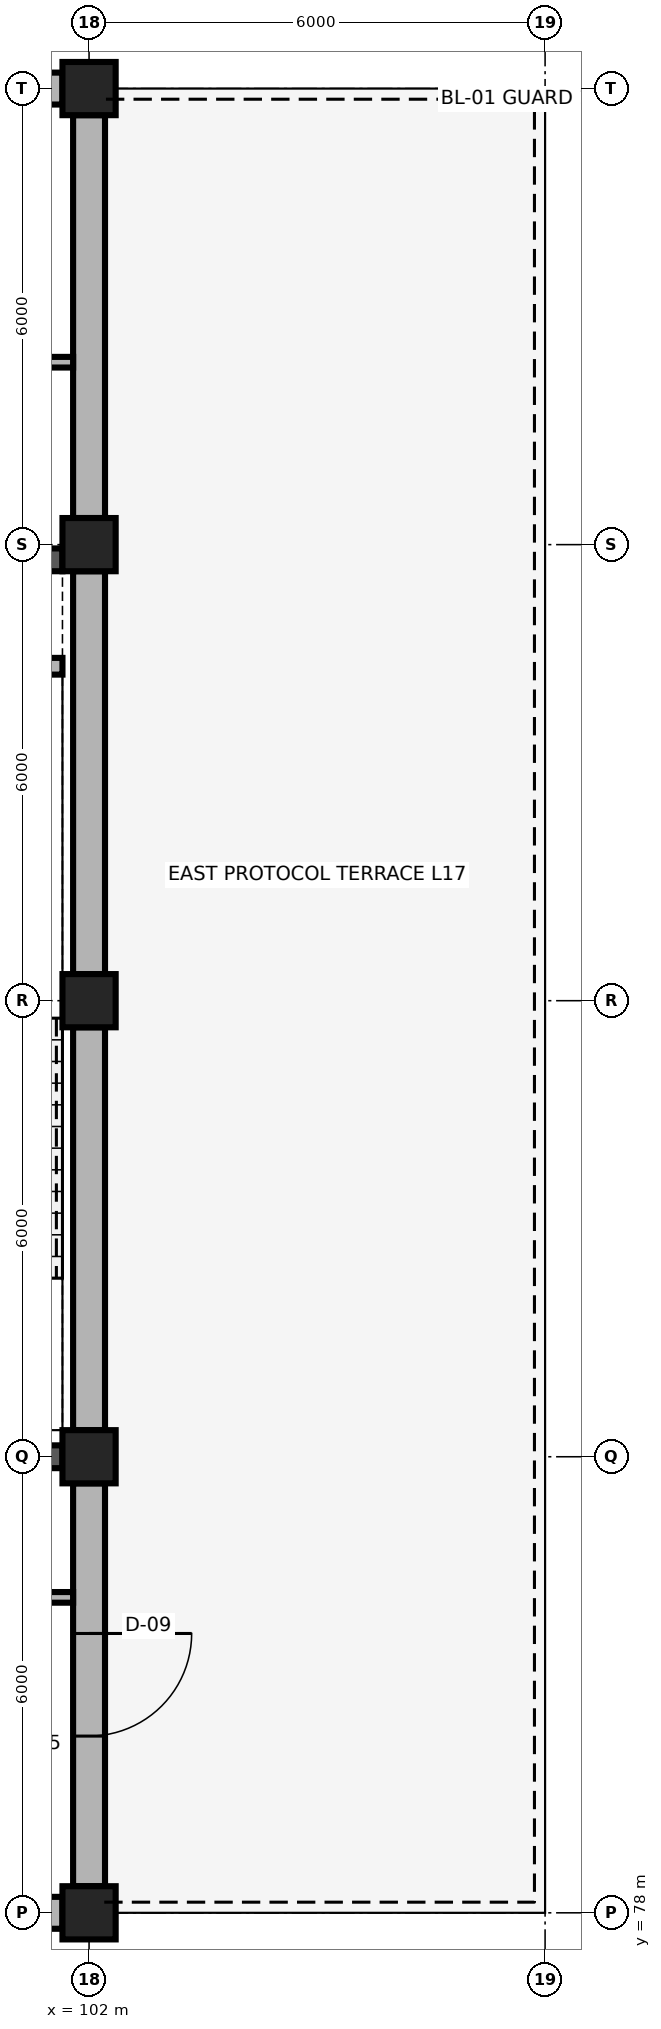
"""IFC4 building model, lengths in metres.
Left out: names, types, materials, properties, quantities, classifications, styles, units other than length and angle.
Written with IfcOpenShell. Run it as: python <this file> out.ifc"""

import sys

from ifc_helpers import new_model, si_unit, direction, frame, frame_2d, origin, origin_2d, place, context, subcontext, project, spatial, rectangle, extrude, element, fill, save


model = new_model("IFC4")
c1 = context("Model", 3, precision=1e-05, world=origin(), true_north=direction((0.0, 1.0)))
c2 = subcontext(c1, "Body", "Model", "MODEL_VIEW")
j1 = project(units=[si_unit("LENGTHUNIT", "METRE"), si_unit("PLANEANGLEUNIT", "RADIAN")], contexts=[c1])
p1 = place(None, origin())
s1 = spatial("IfcSite", under=j1, at=p1, CompositionType="ELEMENT")
p2 = place(p1, origin())
s2 = spatial("IfcBuilding", under=s1, at=p2, CompositionType="ELEMENT")
p3 = place(p2, frame((0.0, 0.0, 67.8)))
s3 = spatial("IfcBuildingStorey", under=s2, at=p3, CompositionType="ELEMENT", Elevation=67.8)
for number, where, z_axis, x_axis in (
    (1, (102.0, 78.0, 0.0), (0.0, 0.0, 1.0), (1.0, 0.0, 0.0)),
    (2, (102.0, 84.0, 0.0), (0.0, 0.0, 1.0), (1.0, 0.0, 0.0)),
    (3, (102.0, 90.0, 0.0), (0.0, 0.0, 1.0), (1.0, 0.0, 0.0)),
    (4, (102.0, 96.0, 0.0), (0.0, 0.0, 1.0), (1.0, 0.0, 0.0)),
    (5, (102.0, 102.0, 0.0), (0.0, 0.0, 1.0), (1.0, 0.0, 0.0)),
):
    element("IfcColumn", number, at=place(p3, frame(where, z_axis=z_axis, x_axis=x_axis)), inside=s3, PredefinedType="COLUMN", context=c2, shape_type="SweptSolid", body=[
        extrude(rectangle(XDim=0.7, YDim=0.7, at=origin_2d()), origin(), (0.0, 0.0, 1.0), 4.2),
    ])
for number, where, z_axis, x_axis in (
    (6, (96.35, 78.0, 0.0), (0.0, 0.0, 1.0), (1.0, 0.0, 0.0)),
    (7, (96.35, 102.0, 0.0), (0.0, 0.0, 1.0), (1.0, 0.0, 0.0)),
):
    element("IfcWall", number, at=place(p3, frame(where, z_axis=z_axis, x_axis=x_axis)), inside=s3, PredefinedType="SOLIDWALL", context=c2, shape_type="SweptSolid", body=[
        extrude(rectangle(XDim=5.3, YDim=0.42, at=frame_2d((2.65, 0.0))), origin(), (0.0, 0.0, 1.0), 3.54),
    ])
p4 = place(p3, frame((102.0, 78.35, 0.0), z_axis=(0.0, 0.0, 1.0), x_axis=(0.0, 1.0, 0.0)))
e8 = element("IfcWall", 8, at=p4, inside=s3, PredefinedType="SOLIDWALL", context=c2, shape_type="SweptSolid", body=[
    extrude(rectangle(XDim=5.3, YDim=0.42, at=frame_2d((2.65, 0.0))), origin(), (0.0, 0.0, 1.0), 3.54),
])
p5 = place(p4, frame((1.975, 0.0, 0.0)))
e9 = element("IfcOpeningElement", 9, at=p5, cuts=e8, PredefinedType="OPENING", context=c2, shape_type="SweptSolid", body=[
    extrude(rectangle(XDim=1.35, YDim=2.35, at=frame_2d((0.675, 1.175))), frame((0.0, 0.225, 0.0), z_axis=(0.0, -1.0, 0.0), x_axis=(1.0, 0.0, 0.0)), (0.0, 0.0, 1.0), 0.45),
])
for number, where, z_axis, x_axis in (
    (10, (102.0, 84.35, 0.0), (0.0, 0.0, 1.0), (0.0, 1.0, 0.0)),
    (11, (102.0, 90.35, 0.0), (0.0, 0.0, 1.0), (0.0, 1.0, 0.0)),
    (12, (102.0, 96.35, 0.0), (0.0, 0.0, 1.0), (0.0, 1.0, 0.0)),
):
    element("IfcWall", number, at=place(p3, frame(where, z_axis=z_axis, x_axis=x_axis)), inside=s3, PredefinedType="SOLIDWALL", context=c2, shape_type="SweptSolid", body=[
        extrude(rectangle(XDim=5.3, YDim=0.42, at=frame_2d((2.65, 0.0))), origin(), (0.0, 0.0, 1.0), 3.54),
    ])
p6 = place(p3, frame((96.35, 84.0, 0.0), z_axis=(0.0, 0.0, 1.0), x_axis=(1.0, 0.0, 0.0)))
e13 = element("IfcWall", 13, at=p6, inside=s3, PredefinedType="SHEAR", context=c2, shape_type="SweptSolid", body=[
    extrude(rectangle(XDim=5.3, YDim=0.3, at=frame_2d((2.65, 0.0))), origin(), (0.0, 0.0, 1.0), 3.96),
])
p7 = place(p6, frame((1.975, 0.0, 0.0)))
e14 = element("IfcOpeningElement", 14, at=p7, cuts=e13, PredefinedType="OPENING", context=c2, shape_type="SweptSolid", body=[
    extrude(rectangle(XDim=1.35, YDim=2.2, at=frame_2d((0.675, 1.1))), frame((0.0, 0.165, 0.0), z_axis=(0.0, -1.0, 0.0), x_axis=(1.0, 0.0, 0.0)), (0.0, 0.0, 1.0), 0.33),
])
p8 = place(p3, frame((96.35, 95.8, 0.0), z_axis=(0.0, 0.0, 1.0), x_axis=(1.0, 0.0, 0.0)))
e15 = element("IfcWall", 15, at=p8, inside=s3, PredefinedType="SHEAR", context=c2, shape_type="SweptSolid", body=[
    extrude(rectangle(XDim=5.3, YDim=0.3, at=frame_2d((2.65, 0.0))), origin(), (0.0, 0.0, 1.0), 3.96),
])
p9 = place(p3, frame((100.55, 94.4, 0.0), z_axis=(0.0, 0.0, 1.0), x_axis=(1.0, 0.0, 0.0)))
e16 = element("IfcWall", 16, at=p9, inside=s3, PredefinedType="PARTITIONING", context=c2, shape_type="SweptSolid", body=[
    extrude(rectangle(XDim=1.1, YDim=0.22, at=frame_2d((0.55, 0.0))), origin(), (0.0, 0.0, 1.0), 3.96),
])
p10 = place(p3, frame((100.3, 82.15, 0.0), z_axis=(0.0, 0.0, 1.0), x_axis=(1.0, 0.0, 0.0)))
e17 = element("IfcWall", 17, at=p10, inside=s3, PredefinedType="PARTITIONING", context=c2, shape_type="SweptSolid", body=[
    extrude(rectangle(XDim=1.49, YDim=0.14, at=frame_2d((0.745, 0.0))), origin(), (0.0, 0.0, 1.0), 3.96),
])
p11 = place(p3, frame((96.0, 98.4, 0.0), z_axis=(0.0, 0.0, 1.0), x_axis=(1.0, 0.0, 0.0)))
e18 = element("IfcWall", 18, at=p11, inside=s3, PredefinedType="PARTITIONING", context=c2, shape_type="SweptSolid", body=[
    extrude(rectangle(XDim=5.79, YDim=0.14, at=frame_2d((2.895, 0.0))), origin(), (0.0, 0.0, 1.0), 3.96),
])
p12 = place(p5, origin())
e19 = element("IfcDoor", 19, at=p12, inside=s3, OperationType="SINGLE_SWING_RIGHT", PredefinedType="DOOR", context=c2, shape_type="SweptSolid", body=[
    extrude(rectangle(XDim=1.35, YDim=2.35, at=frame_2d((0.675, 1.175))), frame((0.0, 0.025, 0.0), z_axis=(0.0, -1.0, 0.0), x_axis=(1.0, 0.0, 0.0)), (0.0, 0.0, 1.0), 0.05),
])
fill(e9, e19)
save(model, sys.argv[1])
